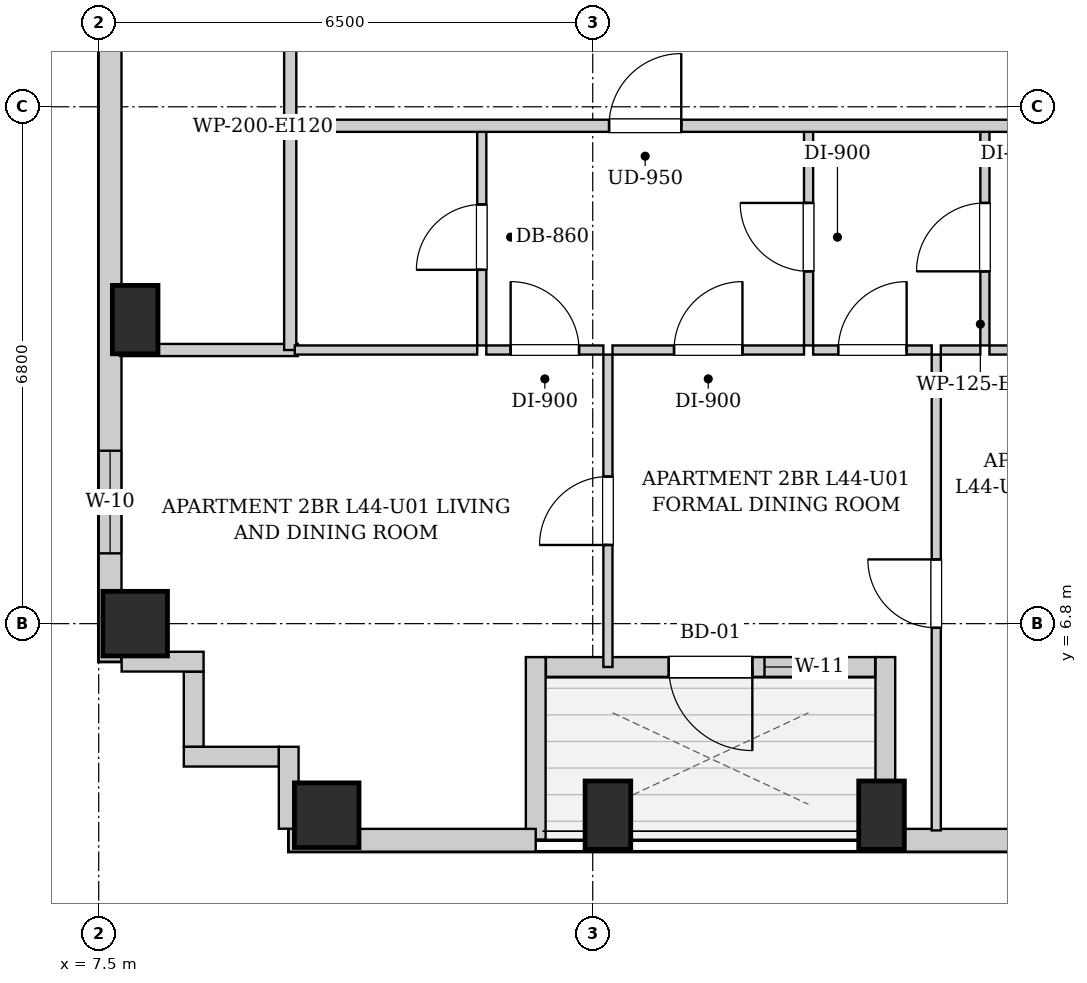
"""IFC4 building model, lengths in metres.
Left out: names, types, materials, properties, quantities, classifications, styles, units other than length and angle.
Written with IfcOpenShell. Run it as: python <this file> out.ifc"""

import sys

from ifc_helpers import new_model, si_unit, direction, frame, frame_2d, origin, origin_2d, place, context, subcontext, project, spatial, rectangle, extrude, element, fill, save


model = new_model("IFC4")
c1 = context("Model", 3, precision=1e-05, world=origin(), true_north=direction((0.0, 1.0)))
c2 = subcontext(c1, "Body", "Model", "MODEL_VIEW")
j1 = project(units=[si_unit("LENGTHUNIT", "METRE"), si_unit("PLANEANGLEUNIT", "RADIAN")], contexts=[c1])
p1 = place(None, origin())
s1 = spatial("IfcSite", under=j1, at=p1, CompositionType="ELEMENT")
p2 = place(p1, origin())
s2 = spatial("IfcBuilding", under=s1, at=p2, CompositionType="ELEMENT")
p3 = place(p2, frame((0.0, 0.0, 153.65)))
s3 = spatial("IfcBuildingStorey", under=s2, at=p3, CompositionType="ELEMENT", Elevation=153.65)
p4 = place(p3, frame((10.5, 4.28, 0.0), z_axis=(0.0, 0.0, 1.0), x_axis=(1.0, 0.0, 0.0)))
e1 = element("IfcColumn", 1, at=p4, inside=s3, PredefinedType="COLUMN", context=c2, shape_type="SweptSolid", body=[
    extrude(rectangle(XDim=0.85, YDim=0.85, at=origin_2d()), origin(), (0.0, 0.0, 1.0), 3.25),
])
for number, where, z_axis, x_axis in (
    (2, (14.2, 4.28, 0.0), (0.0, 0.0, 1.0), (1.0, 0.0, 0.0)),
    (3, (17.8, 4.28, 0.0), (0.0, 0.0, 1.0), (1.0, 0.0, 0.0)),
):
    element("IfcColumn", number, at=place(p3, frame(where, z_axis=z_axis, x_axis=x_axis)), inside=s3, PredefinedType="COLUMN", context=c2, shape_type="SweptSolid", body=[
        extrude(rectangle(XDim=0.6, YDim=0.9, at=origin_2d()), origin(), (0.0, 0.0, 1.0), 3.25),
    ])
p5 = place(p3, frame((7.98, 6.8, 0.0), z_axis=(0.0, 0.0, 1.0), x_axis=(1.0, 0.0, 0.0)))
e4 = element("IfcColumn", 4, at=p5, inside=s3, PredefinedType="COLUMN", context=c2, shape_type="SweptSolid", body=[
    extrude(rectangle(XDim=0.85, YDim=0.85, at=origin_2d()), origin(), (0.0, 0.0, 1.0), 3.25),
])
p6 = place(p3, frame((7.98, 10.8, 0.0), z_axis=(0.0, 0.0, 1.0), x_axis=(1.0, 0.0, 0.0)))
e5 = element("IfcColumn", 5, at=p6, inside=s3, PredefinedType="COLUMN", context=c2, shape_type="SweptSolid", body=[
    extrude(rectangle(XDim=0.6, YDim=0.9, at=origin_2d()), origin(), (0.0, 0.0, 1.0), 3.25),
])
p7 = place(p3, frame((37.8, 3.95, 0.0), z_axis=(0.0, 0.0, 1.0), x_axis=(-1.0, 0.0, 0.0)))
e6 = element("IfcWall", 6, at=p7, inside=s3, PredefinedType="SOLIDWALL", context=c2, shape_type="SweptSolid", body=[
    extrude(rectangle(XDim=19.95, YDim=0.3, at=frame_2d((9.975, 0.0))), origin(), (0.0, 0.0, 1.0), 2.99),
])
p8 = place(p7, frame((16.555, 0.0, 0.55)))
e7 = element("IfcOpeningElement", 7, at=p8, cuts=e6, PredefinedType="OPENING", context=c2, shape_type="SweptSolid", body=[
    extrude(rectangle(XDim=1.35, YDim=1.2, at=frame_2d((0.675, 0.6))), frame((0.0, 0.16, 0.0), z_axis=(0.0, -1.0, 0.0), x_axis=(1.0, 0.0, 0.0)), (0.0, 0.0, 1.0), 0.32),
])
p9 = place(p7, frame((7.788, 0.0, 0.55)))
e8 = element("IfcOpeningElement", 8, at=p9, cuts=e6, PredefinedType="OPENING", context=c2, shape_type="SweptSolid", body=[
    extrude(rectangle(XDim=1.35, YDim=1.2, at=frame_2d((0.675, 0.6))), frame((0.0, 0.16, 0.0), z_axis=(0.0, -1.0, 0.0), x_axis=(1.0, 0.0, 0.0)), (0.0, 0.0, 1.0), 0.32),
])
p10 = place(p7, frame((5.06, 0.0, 0.55)))
e9 = element("IfcOpeningElement", 9, at=p10, cuts=e6, PredefinedType="OPENING", context=c2, shape_type="SweptSolid", body=[
    extrude(rectangle(XDim=1.35, YDim=1.2, at=frame_2d((0.675, 0.6))), frame((0.0, 0.16, 0.0), z_axis=(0.0, -1.0, 0.0), x_axis=(1.0, 0.0, 0.0)), (0.0, 0.0, 1.0), 0.32),
])
p11 = place(p3, frame((17.85, 3.96, 0.0), z_axis=(0.0, 0.0, 1.0), x_axis=(0.0, 1.0, 0.0)))
e10 = element("IfcWall", 10, at=p11, inside=s3, PredefinedType="SOLIDWALL", context=c2, shape_type="SweptSolid", body=[
    extrude(rectangle(XDim=2.4, YDim=0.26, at=frame_2d((1.2, 0.0))), origin(), (0.0, 0.0, 1.0), 2.442),
])
p12 = place(p3, frame((17.716, 6.23, 0.0), z_axis=(0.0, 0.0, 1.0), x_axis=(-1.0, 0.0, 0.0)))
e11 = element("IfcWall", 11, at=p12, inside=s3, PredefinedType="SOLIDWALL", context=c2, shape_type="SweptSolid", body=[
    extrude(rectangle(XDim=4.332, YDim=0.26, at=frame_2d((2.166, 0.0))), origin(), (0.0, 0.0, 1.0), 2.99),
])
p13 = place(p12, frame((1.616, 0.0, 0.0)))
e12 = element("IfcOpeningElement", 12, at=p13, cuts=e11, PredefinedType="OPENING", context=c2, shape_type="SweptSolid", body=[
    extrude(rectangle(XDim=1.1, YDim=2.0, at=frame_2d((0.55, 1.0))), frame((0.0, 0.14, 0.0), z_axis=(0.0, -1.0, 0.0), x_axis=(1.0, 0.0, 0.0)), (0.0, 0.0, 1.0), 0.28),
])
p14 = place(p12, frame((0.606, 0.0, 0.55)))
e13 = element("IfcOpeningElement", 13, at=p14, cuts=e11, PredefinedType="OPENING", context=c2, shape_type="SweptSolid", body=[
    extrude(rectangle(XDim=0.85, YDim=1.2, at=frame_2d((0.425, 0.6))), frame((0.0, 0.14, 0.0), z_axis=(0.0, -1.0, 0.0), x_axis=(1.0, 0.0, 0.0)), (0.0, 0.0, 1.0), 0.28),
])
p15 = place(p3, frame((13.25, 6.36, 0.0), z_axis=(0.0, 0.0, 1.0), x_axis=(0.0, -1.0, 0.0)))
e14 = element("IfcWall", 14, at=p15, inside=s3, PredefinedType="SOLIDWALL", context=c2, shape_type="SweptSolid", body=[
    extrude(rectangle(XDim=2.4, YDim=0.26, at=frame_2d((1.2, 0.0))), origin(), (0.0, 0.0, 1.0), 2.99),
])
p16 = place(p3, frame((13.25, 3.95, 0.0), z_axis=(0.0, 0.0, 1.0), x_axis=(-1.0, 0.0, 0.0)))
e15 = element("IfcWall", 15, at=p16, inside=s3, PredefinedType="SOLIDWALL", context=c2, shape_type="SweptSolid", body=[
    extrude(rectangle(XDim=3.25, YDim=0.3, at=frame_2d((1.625, 0.0))), origin(), (0.0, 0.0, 1.0), 2.99),
])
p17 = place(p3, frame((7.65, 6.3, 0.0), z_axis=(0.0, 0.0, 1.0), x_axis=(0.0, 1.0, 0.0)))
e16 = element("IfcWall", 16, at=p17, inside=s3, PredefinedType="SOLIDWALL", context=c2, shape_type="SweptSolid", body=[
    extrude(rectangle(XDim=34.5, YDim=0.3, at=frame_2d((17.25, 0.0))), origin(), (0.0, 0.0, 1.0), 2.99),
])
p18 = place(p17, frame((1.425, 0.0, 0.55)))
e17 = element("IfcOpeningElement", 17, at=p18, cuts=e16, PredefinedType="OPENING", context=c2, shape_type="SweptSolid", body=[
    extrude(rectangle(XDim=1.35, YDim=1.2, at=frame_2d((0.675, 0.6))), frame((0.0, 0.16, 0.0), z_axis=(0.0, -1.0, 0.0), x_axis=(1.0, 0.0, 0.0)), (0.0, 0.0, 1.0), 0.32),
])
p19 = place(p17, frame((30.15, 0.0, 0.55)))
e18 = element("IfcOpeningElement", 18, at=p19, cuts=e16, PredefinedType="OPENING", context=c2, shape_type="SweptSolid", body=[
    extrude(rectangle(XDim=1.35, YDim=1.2, at=frame_2d((0.675, 0.6))), frame((0.0, 0.16, 0.0), z_axis=(0.0, -1.0, 0.0), x_axis=(1.0, 0.0, 0.0)), (0.0, 0.0, 1.0), 0.32),
])
p20 = place(p17, frame((28.31, 0.0, 0.55)))
e19 = element("IfcOpeningElement", 19, at=p20, cuts=e16, PredefinedType="OPENING", context=c2, shape_type="SweptSolid", body=[
    extrude(rectangle(XDim=1.35, YDim=1.2, at=frame_2d((0.675, 0.6))), frame((0.0, 0.16, 0.0), z_axis=(0.0, -1.0, 0.0), x_axis=(1.0, 0.0, 0.0)), (0.0, 0.0, 1.0), 0.32),
])
p21 = place(p17, frame((10.35, 0.0, 0.55)))
e20 = element("IfcOpeningElement", 20, at=p21, cuts=e16, PredefinedType="OPENING", context=c2, shape_type="SweptSolid", body=[
    extrude(rectangle(XDim=1.35, YDim=1.2, at=frame_2d((0.675, 0.6))), frame((0.0, 0.16, 0.0), z_axis=(0.0, -1.0, 0.0), x_axis=(1.0, 0.0, 0.0)), (0.0, 0.0, 1.0), 0.32),
])
p22 = place(p17, frame((19.725, 0.0, 0.55)))
e21 = element("IfcOpeningElement", 21, at=p22, cuts=e16, PredefinedType="OPENING", context=c2, shape_type="SweptSolid", body=[
    extrude(rectangle(XDim=1.35, YDim=1.2, at=frame_2d((0.675, 0.6))), frame((0.0, 0.16, 0.0), z_axis=(0.0, -1.0, 0.0), x_axis=(1.0, 0.0, 0.0)), (0.0, 0.0, 1.0), 0.32),
])
p23 = place(p3, frame((10.0, 4.102, 0.0), z_axis=(0.0, 0.0, 1.0), x_axis=(0.0, 1.0, 0.0)))
e22 = element("IfcWall", 22, at=p23, inside=s3, PredefinedType="SOLIDWALL", context=c2, shape_type="SweptSolid", body=[
    extrude(rectangle(XDim=1.078, YDim=0.26, at=frame_2d((0.539, 0.0))), origin(), (0.0, 0.0, 1.0), 2.99),
])
p24 = place(p3, frame((9.868, 5.05, 0.0), z_axis=(0.0, 0.0, 1.0), x_axis=(-1.0, 0.0, 0.0)))
e23 = element("IfcWall", 23, at=p24, inside=s3, PredefinedType="SOLIDWALL", context=c2, shape_type="SweptSolid", body=[
    extrude(rectangle(XDim=1.248, YDim=0.26, at=frame_2d((0.624, 0.0))), origin(), (0.0, 0.0, 1.0), 2.99),
])
p25 = place(p3, frame((8.75, 5.182, 0.0), z_axis=(0.0, 0.0, 1.0), x_axis=(0.0, 1.0, 0.0)))
e24 = element("IfcWall", 24, at=p25, inside=s3, PredefinedType="SOLIDWALL", context=c2, shape_type="SweptSolid", body=[
    extrude(rectangle(XDim=0.986, YDim=0.26, at=frame_2d((0.493, 0.0))), origin(), (0.0, 0.0, 1.0), 2.99),
])
p26 = place(p3, frame((8.88, 6.3, 0.0), z_axis=(0.0, 0.0, 1.0), x_axis=(-1.0, 0.0, 0.0)))
e25 = element("IfcWall", 25, at=p26, inside=s3, PredefinedType="SOLIDWALL", context=c2, shape_type="SweptSolid", body=[
    extrude(rectangle(XDim=1.078, YDim=0.26, at=frame_2d((0.539, 0.0))), origin(), (0.0, 0.0, 1.0), 2.99),
])
p27 = place(p3, frame((10.02, 13.35, 0.0), z_axis=(0.0, 0.0, 1.0), x_axis=(0.0, 1.0, 0.0)))
e26 = element("IfcWall", 26, at=p27, inside=s3, PredefinedType="PARTITIONING", context=c2, shape_type="SweptSolid", body=[
    extrude(rectangle(XDim=1.74, YDim=0.16, at=frame_2d((0.87, 0.0))), origin(), (0.0, 0.0, 1.0), 2.99),
])
p28 = place(p3, frame((7.78, 10.4, 0.0), z_axis=(0.0, 0.0, 1.0), x_axis=(1.0, 0.0, 0.0)))
e27 = element("IfcWall", 27, at=p28, inside=s3, PredefinedType="PARTITIONING", context=c2, shape_type="SweptSolid", body=[
    extrude(rectangle(XDim=2.34, YDim=0.16, at=frame_2d((1.17, 0.0))), origin(), (0.0, 0.0, 1.0), 2.99),
])
p29 = place(p3, frame((10.02, 10.4, 0.0), z_axis=(0.0, 0.0, 1.0), x_axis=(0.0, 1.0, 0.0)))
e28 = element("IfcWall", 28, at=p29, inside=s3, PredefinedType="PARTITIONING", context=c2, shape_type="SweptSolid", body=[
    extrude(rectangle(XDim=2.91, YDim=0.16, at=frame_2d((1.455, 0.0))), origin(), (0.0, 0.0, 1.0), 2.99),
])
p30 = place(p3, frame((12.54, 10.46, 0.0), z_axis=(0.0, 0.0, 1.0), x_axis=(0.0, 1.0, 0.0)))
e29 = element("IfcWall", 29, at=p30, inside=s3, PredefinedType="PARTITIONING", context=c2, shape_type="SweptSolid", body=[
    extrude(rectangle(XDim=2.85, YDim=0.12, at=frame_2d((1.425, 0.0))), origin(), (0.0, 0.0, 1.0), 2.99),
])
p31 = place(p30, frame((0.995, 0.0, 0.0)))
e30 = element("IfcOpeningElement", 30, at=p31, cuts=e29, PredefinedType="OPENING", context=c2, shape_type="SweptSolid", body=[
    extrude(rectangle(XDim=0.86, YDim=2.05, at=frame_2d((0.43, 1.025))), frame((0.0, 0.07, 0.0), z_axis=(0.0, -1.0, 0.0), x_axis=(1.0, 0.0, 0.0)), (0.0, 0.0, 1.0), 0.14),
])
p32 = place(p3, frame((10.08, 10.4, 0.0), z_axis=(0.0, 0.0, 1.0), x_axis=(1.0, 0.0, 0.0)))
e31 = element("IfcWall", 31, at=p32, inside=s3, PredefinedType="PARTITIONING", context=c2, shape_type="SweptSolid", body=[
    extrude(rectangle(XDim=2.4, YDim=0.12, at=frame_2d((1.2, 0.0))), origin(), (0.0, 0.0, 1.0), 2.99),
])
p33 = place(p3, frame((16.84, 10.46, 0.0), z_axis=(0.0, 0.0, 1.0), x_axis=(0.0, 1.0, 0.0)))
e32 = element("IfcWall", 32, at=p33, inside=s3, PredefinedType="PARTITIONING", context=c2, shape_type="SweptSolid", body=[
    extrude(rectangle(XDim=2.85, YDim=0.12, at=frame_2d((1.425, 0.0))), origin(), (0.0, 0.0, 1.0), 2.99),
])
p34 = place(p33, frame((0.975, 0.0, 0.0)))
e33 = element("IfcOpeningElement", 33, at=p34, cuts=e32, PredefinedType="OPENING", context=c2, shape_type="SweptSolid", body=[
    extrude(rectangle(XDim=0.9, YDim=2.05, at=frame_2d((0.45, 1.025))), frame((0.0, 0.07, 0.0), z_axis=(0.0, -1.0, 0.0), x_axis=(1.0, 0.0, 0.0)), (0.0, 0.0, 1.0), 0.14),
])
p35 = place(p3, frame((12.6, 10.4, 0.0), z_axis=(0.0, 0.0, 1.0), x_axis=(1.0, 0.0, 0.0)))
e34 = element("IfcWall", 34, at=p35, inside=s3, PredefinedType="PARTITIONING", context=c2, shape_type="SweptSolid", body=[
    extrude(rectangle(XDim=1.54, YDim=0.12, at=frame_2d((0.77, 0.0))), origin(), (0.0, 0.0, 1.0), 2.99),
])
p36 = place(p35, frame((0.32, 0.0, 0.0)))
e35 = element("IfcOpeningElement", 35, at=p36, cuts=e34, PredefinedType="OPENING", context=c2, shape_type="SweptSolid", body=[
    extrude(rectangle(XDim=0.9, YDim=2.05, at=frame_2d((0.45, 1.025))), frame((0.0, 0.07, 0.0), z_axis=(0.0, -1.0, 0.0), x_axis=(1.0, 0.0, 0.0)), (0.0, 0.0, 1.0), 0.14),
])
p37 = place(p3, frame((14.26, 10.4, 0.0), z_axis=(0.0, 0.0, 1.0), x_axis=(1.0, 0.0, 0.0)))
e36 = element("IfcWall", 36, at=p37, inside=s3, PredefinedType="PARTITIONING", context=c2, shape_type="SweptSolid", body=[
    extrude(rectangle(XDim=2.52, YDim=0.12, at=frame_2d((1.26, 0.0))), origin(), (0.0, 0.0, 1.0), 2.99),
])
p38 = place(p37, frame((0.81, 0.0, 0.0)))
e37 = element("IfcOpeningElement", 37, at=p38, cuts=e36, PredefinedType="OPENING", context=c2, shape_type="SweptSolid", body=[
    extrude(rectangle(XDim=0.9, YDim=2.05, at=frame_2d((0.45, 1.025))), frame((0.0, 0.07, 0.0), z_axis=(0.0, -1.0, 0.0), x_axis=(1.0, 0.0, 0.0)), (0.0, 0.0, 1.0), 0.14),
])
p39 = place(p3, frame((19.16, 10.46, 0.0), z_axis=(0.0, 0.0, 1.0), x_axis=(0.0, 1.0, 0.0)))
e38 = element("IfcWall", 38, at=p39, inside=s3, PredefinedType="PARTITIONING", context=c2, shape_type="SweptSolid", body=[
    extrude(rectangle(XDim=2.85, YDim=0.12, at=frame_2d((1.425, 0.0))), origin(), (0.0, 0.0, 1.0), 2.99),
])
p40 = place(p39, frame((0.975, 0.0, 0.0)))
e39 = element("IfcOpeningElement", 39, at=p40, cuts=e38, PredefinedType="OPENING", context=c2, shape_type="SweptSolid", body=[
    extrude(rectangle(XDim=0.9, YDim=2.05, at=frame_2d((0.45, 1.025))), frame((0.0, 0.07, 0.0), z_axis=(0.0, -1.0, 0.0), x_axis=(1.0, 0.0, 0.0)), (0.0, 0.0, 1.0), 0.14),
])
p41 = place(p3, frame((16.9, 10.4, 0.0), z_axis=(0.0, 0.0, 1.0), x_axis=(1.0, 0.0, 0.0)))
e40 = element("IfcWall", 40, at=p41, inside=s3, PredefinedType="PARTITIONING", context=c2, shape_type="SweptSolid", body=[
    extrude(rectangle(XDim=1.56, YDim=0.12, at=frame_2d((0.78, 0.0))), origin(), (0.0, 0.0, 1.0), 2.99),
])
p42 = place(p41, frame((0.33, 0.0, 0.0)))
e41 = element("IfcOpeningElement", 41, at=p42, cuts=e40, PredefinedType="OPENING", context=c2, shape_type="SweptSolid", body=[
    extrude(rectangle(XDim=0.9, YDim=2.05, at=frame_2d((0.45, 1.025))), frame((0.0, 0.07, 0.0), z_axis=(0.0, -1.0, 0.0), x_axis=(1.0, 0.0, 0.0)), (0.0, 0.0, 1.0), 0.14),
])
p43 = place(p3, frame((18.58, 10.4, 0.0), z_axis=(0.0, 0.0, 1.0), x_axis=(1.0, 0.0, 0.0)))
e42 = element("IfcWall", 42, at=p43, inside=s3, PredefinedType="PARTITIONING", context=c2, shape_type="SweptSolid", body=[
    extrude(rectangle(XDim=0.52, YDim=0.12, at=frame_2d((0.26, 0.0))), origin(), (0.0, 0.0, 1.0), 2.99),
])
p44 = place(p3, frame((19.22, 10.4, 0.0), z_axis=(0.0, 0.0, 1.0), x_axis=(1.0, 0.0, 0.0)))
e43 = element("IfcWall", 43, at=p44, inside=s3, PredefinedType="PARTITIONING", context=c2, shape_type="SweptSolid", body=[
    extrude(rectangle(XDim=2.2, YDim=0.12, at=frame_2d((1.1, 0.0))), origin(), (0.0, 0.0, 1.0), 2.99),
])
p45 = place(p44, frame((0.65, 0.0, 0.0)))
e44 = element("IfcOpeningElement", 44, at=p45, cuts=e43, PredefinedType="OPENING", context=c2, shape_type="SweptSolid", body=[
    extrude(rectangle(XDim=0.9, YDim=2.05, at=frame_2d((0.45, 1.025))), frame((0.0, 0.07, 0.0), z_axis=(0.0, -1.0, 0.0), x_axis=(1.0, 0.0, 0.0)), (0.0, 0.0, 1.0), 0.14),
])
p46 = place(p3, frame((14.2, 6.23, 0.0), z_axis=(0.0, 0.0, 1.0), x_axis=(0.0, 1.0, 0.0)))
e45 = element("IfcWall", 45, at=p46, inside=s3, PredefinedType="PARTITIONING", context=c2, shape_type="SweptSolid", body=[
    extrude(rectangle(XDim=4.11, YDim=0.12, at=frame_2d((2.055, 0.0))), origin(), (0.0, 0.0, 1.0), 2.99),
])
p47 = place(p46, frame((1.605, 0.0, 0.0)))
e46 = element("IfcOpeningElement", 46, at=p47, cuts=e45, PredefinedType="OPENING", context=c2, shape_type="SweptSolid", body=[
    extrude(rectangle(XDim=0.9, YDim=2.05, at=frame_2d((0.45, 1.025))), frame((0.0, 0.07, 0.0), z_axis=(0.0, -1.0, 0.0), x_axis=(1.0, 0.0, 0.0)), (0.0, 0.0, 1.0), 0.14),
])
p48 = place(p3, frame((18.52, 4.08, 0.0), z_axis=(0.0, 0.0, 1.0), x_axis=(0.0, 1.0, 0.0)))
e47 = element("IfcWall", 47, at=p48, inside=s3, PredefinedType="PARTITIONING", context=c2, shape_type="SweptSolid", body=[
    extrude(rectangle(XDim=6.26, YDim=0.12, at=frame_2d((3.13, 0.0))), origin(), (0.0, 0.0, 1.0), 2.99),
])
p49 = place(p48, frame((2.665, 0.0, 0.0)))
e48 = element("IfcOpeningElement", 48, at=p49, cuts=e47, PredefinedType="OPENING", context=c2, shape_type="SweptSolid", body=[
    extrude(rectangle(XDim=0.9, YDim=2.05, at=frame_2d((0.45, 1.025))), frame((0.0, 0.07, 0.0), z_axis=(0.0, -1.0, 0.0), x_axis=(1.0, 0.0, 0.0)), (0.0, 0.0, 1.0), 0.14),
])
p50 = place(p3, frame((10.05, 13.35, 0.0), z_axis=(0.0, 0.0, 1.0), x_axis=(1.0, 0.0, 0.0)))
e49 = element("IfcWall", 49, at=p50, inside=s3, PredefinedType="PARTITIONING", context=c2, shape_type="SweptSolid", body=[
    extrude(rectangle(XDim=27.7, YDim=0.16, at=frame_2d((13.85, 0.0))), origin(), (0.0, 0.0, 1.0), 2.99),
])
p51 = place(p50, frame((4.165, 0.0, 0.0)))
e50 = element("IfcOpeningElement", 50, at=p51, cuts=e49, PredefinedType="OPENING", context=c2, shape_type="SweptSolid", body=[
    extrude(rectangle(XDim=0.95, YDim=2.1, at=frame_2d((0.475, 1.05))), frame((0.0, 0.09, 0.0), z_axis=(0.0, -1.0, 0.0), x_axis=(1.0, 0.0, 0.0)), (0.0, 0.0, 1.0), 0.18),
])
p52 = place(p31, origin())
e51 = element("IfcDoor", 51, at=p52, inside=s3, OperationType="SINGLE_SWING_LEFT", PredefinedType="DOOR", context=c2, shape_type="SweptSolid", body=[
    extrude(rectangle(XDim=0.86, YDim=2.05, at=frame_2d((0.43, 1.025))), frame((0.0, 0.025, 0.0), z_axis=(0.0, -1.0, 0.0), x_axis=(1.0, 0.0, 0.0)), (0.0, 0.0, 1.0), 0.05),
])
fill(e30, e51)
p53 = place(p34, origin())
e52 = element("IfcDoor", 52, at=p53, inside=s3, OperationType="SINGLE_SWING_RIGHT", PredefinedType="DOOR", context=c2, shape_type="SweptSolid", body=[
    extrude(rectangle(XDim=0.9, YDim=2.05, at=frame_2d((0.45, 1.025))), frame((0.0, 0.025, 0.0), z_axis=(0.0, -1.0, 0.0), x_axis=(1.0, 0.0, 0.0)), (0.0, 0.0, 1.0), 0.05),
])
fill(e33, e52)
p54 = place(p36, origin())
e53 = element("IfcDoor", 53, at=p54, inside=s3, OperationType="SINGLE_SWING_LEFT", PredefinedType="DOOR", context=c2, shape_type="SweptSolid", body=[
    extrude(rectangle(XDim=0.9, YDim=2.05, at=frame_2d((0.45, 1.025))), frame((0.0, 0.025, 0.0), z_axis=(0.0, -1.0, 0.0), x_axis=(1.0, 0.0, 0.0)), (0.0, 0.0, 1.0), 0.05),
])
fill(e35, e53)
p55 = place(p38, origin())
e54 = element("IfcDoor", 54, at=p55, inside=s3, OperationType="SINGLE_SWING_RIGHT", PredefinedType="DOOR", context=c2, shape_type="SweptSolid", body=[
    extrude(rectangle(XDim=0.9, YDim=2.05, at=frame_2d((0.45, 1.025))), frame((0.0, 0.025, 0.0), z_axis=(0.0, -1.0, 0.0), x_axis=(1.0, 0.0, 0.0)), (0.0, 0.0, 1.0), 0.05),
])
fill(e37, e54)
p56 = place(p40, origin())
e55 = element("IfcDoor", 55, at=p56, inside=s3, OperationType="SINGLE_SWING_LEFT", PredefinedType="DOOR", context=c2, shape_type="SweptSolid", body=[
    extrude(rectangle(XDim=0.9, YDim=2.05, at=frame_2d((0.45, 1.025))), frame((0.0, 0.025, 0.0), z_axis=(0.0, -1.0, 0.0), x_axis=(1.0, 0.0, 0.0)), (0.0, 0.0, 1.0), 0.05),
])
fill(e39, e55)
p57 = place(p42, origin())
e56 = element("IfcDoor", 56, at=p57, inside=s3, OperationType="SINGLE_SWING_RIGHT", PredefinedType="DOOR", context=c2, shape_type="SweptSolid", body=[
    extrude(rectangle(XDim=0.9, YDim=2.05, at=frame_2d((0.45, 1.025))), frame((0.0, 0.025, 0.0), z_axis=(0.0, -1.0, 0.0), x_axis=(1.0, 0.0, 0.0)), (0.0, 0.0, 1.0), 0.05),
])
fill(e41, e56)
p58 = place(p47, origin())
e57 = element("IfcDoor", 57, at=p58, inside=s3, OperationType="SINGLE_SWING_LEFT", PredefinedType="DOOR", context=c2, shape_type="SweptSolid", body=[
    extrude(rectangle(XDim=0.9, YDim=2.05, at=frame_2d((0.45, 1.025))), frame((0.0, 0.025, 0.0), z_axis=(0.0, -1.0, 0.0), x_axis=(1.0, 0.0, 0.0)), (0.0, 0.0, 1.0), 0.05),
])
fill(e46, e57)
p59 = place(p49, origin())
e58 = element("IfcDoor", 58, at=p59, inside=s3, OperationType="SINGLE_SWING_RIGHT", PredefinedType="DOOR", context=c2, shape_type="SweptSolid", body=[
    extrude(rectangle(XDim=0.9, YDim=2.05, at=frame_2d((0.45, 1.025))), frame((0.0, 0.025, 0.0), z_axis=(0.0, -1.0, 0.0), x_axis=(1.0, 0.0, 0.0)), (0.0, 0.0, 1.0), 0.05),
])
fill(e48, e58)
p60 = place(p51, origin())
e59 = element("IfcDoor", 59, at=p60, inside=s3, OperationType="SINGLE_SWING_RIGHT", PredefinedType="DOOR", context=c2, shape_type="SweptSolid", body=[
    extrude(rectangle(XDim=0.95, YDim=2.1, at=frame_2d((0.475, 1.05))), frame((0.0, 0.025, 0.0), z_axis=(0.0, -1.0, 0.0), x_axis=(1.0, 0.0, 0.0)), (0.0, 0.0, 1.0), 0.05),
])
fill(e50, e59)
p61 = place(p13, origin())
e60 = element("IfcDoor", 60, at=p61, inside=s3, OperationType="SINGLE_SWING_LEFT", PredefinedType="DOOR", context=c2, shape_type="SweptSolid", body=[
    extrude(rectangle(XDim=1.1, YDim=2.0, at=frame_2d((0.55, 1.0))), frame((0.0, 0.025, 0.0), z_axis=(0.0, -1.0, 0.0), x_axis=(1.0, 0.0, 0.0)), (0.0, 0.0, 1.0), 0.05),
])
fill(e12, e60)
p62 = place(p18, origin())
e61 = element("IfcWindow", 61, at=p62, inside=s3, PartitioningType="SINGLE_PANEL", PredefinedType="WINDOW", context=c2, shape_type="SweptSolid", body=[
    extrude(rectangle(XDim=1.35, YDim=1.2, at=frame_2d((0.675, 0.6))), frame((0.0, 0.03, 0.0), z_axis=(0.0, -1.0, 0.0), x_axis=(1.0, 0.0, 0.0)), (0.0, 0.0, 1.0), 0.06),
])
fill(e17, e61)
p63 = place(p14, origin())
e62 = element("IfcWindow", 62, at=p63, inside=s3, PartitioningType="SINGLE_PANEL", PredefinedType="WINDOW", context=c2, shape_type="SweptSolid", body=[
    extrude(rectangle(XDim=0.85, YDim=1.2, at=frame_2d((0.425, 0.6))), frame((0.0, 0.03, 0.0), z_axis=(0.0, -1.0, 0.0), x_axis=(1.0, 0.0, 0.0)), (0.0, 0.0, 1.0), 0.06),
])
fill(e13, e62)
save(model, sys.argv[1])
